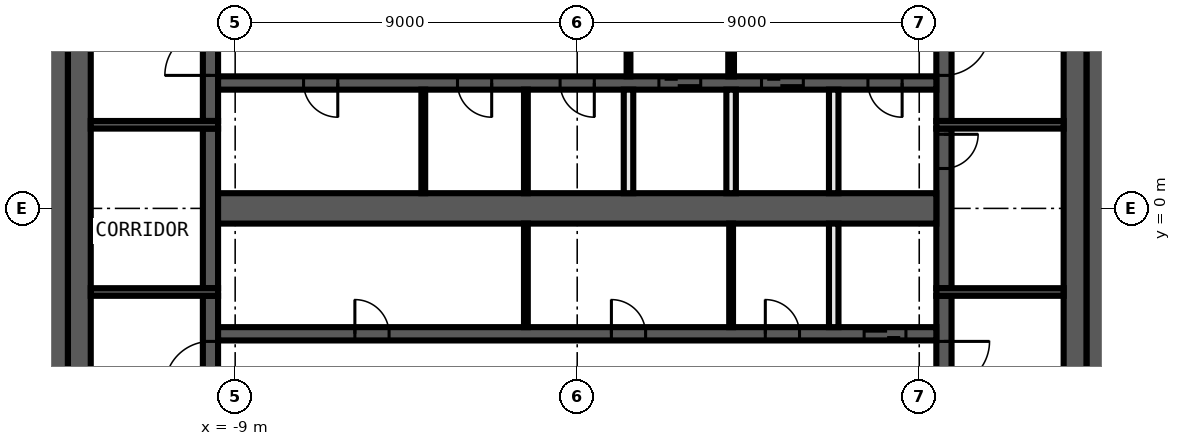
"""IFC4 building model, lengths in metres.
Left out: names, types, materials, properties, quantities, classifications, styles, units other than length and angle.
Written with IfcOpenShell. Run it as: python <this file> out.ifc"""

import sys

from ifc_helpers import new_model, si_unit, direction, frame, frame_2d, origin, place, context, subcontext, project, spatial, rectangle, extrude, element, fill, save


model = new_model("IFC4")
c1 = context("Model", 3, precision=1e-05, world=origin(), true_north=direction((0.0, 1.0)))
c2 = subcontext(c1, "Body", "Model", "MODEL_VIEW")
j1 = project(units=[si_unit("LENGTHUNIT", "METRE"), si_unit("PLANEANGLEUNIT", "RADIAN")], contexts=[c1])
p1 = place(None, origin())
s1 = spatial("IfcSite", under=j1, at=p1, CompositionType="ELEMENT")
p2 = place(p1, origin())
s2 = spatial("IfcBuilding", under=s1, at=p2, CompositionType="ELEMENT")
p3 = place(p2, frame((0.0, 0.0, 311.0)))
s3 = spatial("IfcBuildingStorey", under=s2, at=p3, CompositionType="ELEMENT", Elevation=311.0)
for number, where, z_axis, x_axis in (
    (1, (13.7, 10.4, 0.0), (0.0, 0.0, 1.0), (0.0, -1.0, 0.0)),
    (2, (-13.7, -10.4, 0.0), (0.0, 0.0, 1.0), (0.0, 1.0, 0.0)),
):
    element("IfcWall", number, at=place(p3, frame(where, z_axis=z_axis, x_axis=x_axis)), inside=s3, PredefinedType="SHEAR", context=c2, shape_type="SweptSolid", body=[
        extrude(rectangle(XDim=20.8, YDim=0.6, at=frame_2d((10.4, 0.0))), origin(), (0.0, 0.0, 1.0), 3.82),
    ])
for number, where, z_axis, x_axis in (
    (3, (13.1, 9.8, 0.0), (0.0, 0.0, 1.0), (0.0, -1.0, 0.0)),
    (4, (-13.1, -9.8, 0.0), (0.0, 0.0, 1.0), (0.0, 1.0, 0.0)),
):
    element("IfcWall", number, at=place(p3, frame(where, z_axis=z_axis, x_axis=x_axis)), inside=s3, PredefinedType="SHEAR", context=c2, shape_type="SweptSolid", body=[
        extrude(rectangle(XDim=19.6, YDim=0.6, at=frame_2d((9.8, 0.0))), origin(), (0.0, 0.0, 1.0), 3.82),
    ])
p4 = place(p3, frame((9.65, -2.3, 0.0), z_axis=(0.0, 0.0, 1.0), x_axis=(0.0, -1.0, 0.0)))
e5 = element("IfcWall", 5, at=p4, inside=s3, PredefinedType="SHEAR", context=c2, shape_type="SweptSolid", body=[
    extrude(rectangle(XDim=7.5, YDim=0.4, at=frame_2d((3.75, 0.0))), origin(), (0.0, 0.0, 1.0), 3.82),
])
p5 = place(p4, frame((1.2, 0.0, 0.0)))
e6 = element("IfcOpeningElement", 6, at=p5, cuts=e5, PredefinedType="OPENING", context=c2, shape_type="SweptSolid", body=[
    extrude(rectangle(XDim=1.2, YDim=2.1, at=frame_2d((0.6, 1.05))), frame((0.0, 0.21, 0.0), z_axis=(0.0, -1.0, 0.0), x_axis=(1.0, 0.0, 0.0)), (0.0, 0.0, 1.0), 0.42),
])
p6 = place(p3, frame((9.65, 2.1, 0.0), z_axis=(0.0, 0.0, 1.0), x_axis=(0.0, -1.0, 0.0)))
e7 = element("IfcWall", 7, at=p6, inside=s3, PredefinedType="SHEAR", context=c2, shape_type="SweptSolid", body=[
    extrude(rectangle(XDim=4.2, YDim=0.4, at=frame_2d((2.1, 0.0))), origin(), (0.0, 0.0, 1.0), 3.82),
])
p7 = place(p6, frame((0.15, 0.0, 0.0)))
e8 = element("IfcOpeningElement", 8, at=p7, cuts=e7, PredefinedType="OPENING", context=c2, shape_type="SweptSolid", body=[
    extrude(rectangle(XDim=0.9, YDim=2.1, at=frame_2d((0.45, 1.05))), frame((0.0, 0.21, 0.0), z_axis=(0.0, -1.0, 0.0), x_axis=(1.0, 0.0, 0.0)), (0.0, 0.0, 1.0), 0.42),
])
p8 = place(p3, frame((9.65, 9.8, 0.0), z_axis=(0.0, 0.0, 1.0), x_axis=(0.0, -1.0, 0.0)))
e9 = element("IfcWall", 9, at=p8, inside=s3, PredefinedType="SHEAR", context=c2, shape_type="SweptSolid", body=[
    extrude(rectangle(XDim=7.5, YDim=0.4, at=frame_2d((3.75, 0.0))), origin(), (0.0, 0.0, 1.0), 3.82),
])
p9 = place(p8, frame((5.1, 0.0, 0.0)))
e10 = element("IfcOpeningElement", 10, at=p9, cuts=e9, PredefinedType="OPENING", context=c2, shape_type="SweptSolid", body=[
    extrude(rectangle(XDim=1.2, YDim=2.1, at=frame_2d((0.6, 1.05))), frame((0.0, 0.21, 0.0), z_axis=(0.0, -1.0, 0.0), x_axis=(1.0, 0.0, 0.0)), (0.0, 0.0, 1.0), 0.42),
])
p10 = place(p3, frame((-9.65, -9.8, 0.0), z_axis=(0.0, 0.0, 1.0), x_axis=(0.0, 1.0, 0.0)))
e11 = element("IfcWall", 11, at=p10, inside=s3, PredefinedType="SHEAR", context=c2, shape_type="SweptSolid", body=[
    extrude(rectangle(XDim=7.5, YDim=0.4, at=frame_2d((3.75, 0.0))), origin(), (0.0, 0.0, 1.0), 3.82),
])
p11 = place(p10, frame((5.1, 0.0, 0.0)))
e12 = element("IfcOpeningElement", 12, at=p11, cuts=e11, PredefinedType="OPENING", context=c2, shape_type="SweptSolid", body=[
    extrude(rectangle(XDim=1.2, YDim=2.1, at=frame_2d((0.6, 1.05))), frame((0.0, 0.21, 0.0), z_axis=(0.0, -1.0, 0.0), x_axis=(1.0, 0.0, 0.0)), (0.0, 0.0, 1.0), 0.42),
])
p12 = place(p3, frame((-9.65, -2.1, 0.0), z_axis=(0.0, 0.0, 1.0), x_axis=(0.0, 1.0, 0.0)))
e13 = element("IfcWall", 13, at=p12, inside=s3, PredefinedType="SHEAR", context=c2, shape_type="SweptSolid", body=[
    extrude(rectangle(XDim=4.2, YDim=0.4, at=frame_2d((2.1, 0.0))), origin(), (0.0, 0.0, 1.0), 3.82),
])
p13 = place(p3, frame((-9.65, 2.3, 0.0), z_axis=(0.0, 0.0, 1.0), x_axis=(0.0, 1.0, 0.0)))
e14 = element("IfcWall", 14, at=p13, inside=s3, PredefinedType="SHEAR", context=c2, shape_type="SweptSolid", body=[
    extrude(rectangle(XDim=7.5, YDim=0.4, at=frame_2d((3.75, 0.0))), origin(), (0.0, 0.0, 1.0), 3.82),
])
p14 = place(p13, frame((1.2, 0.0, 0.0)))
e15 = element("IfcOpeningElement", 15, at=p14, cuts=e14, PredefinedType="OPENING", context=c2, shape_type="SweptSolid", body=[
    extrude(rectangle(XDim=1.2, YDim=2.1, at=frame_2d((0.6, 1.05))), frame((0.0, 0.21, 0.0), z_axis=(0.0, -1.0, 0.0), x_axis=(1.0, 0.0, 0.0)), (0.0, 0.0, 1.0), 0.42),
])
for number, where, z_axis, x_axis in (
    (16, (9.45, 2.2, 0.0), (0.0, 0.0, 1.0), (1.0, 0.0, 0.0)),
    (17, (-9.45, 2.2, 0.0), (0.0, 0.0, 1.0), (-1.0, 0.0, 0.0)),
    (18, (9.45, -2.2, 0.0), (0.0, 0.0, 1.0), (1.0, 0.0, 0.0)),
    (19, (-9.45, -2.2, 0.0), (0.0, 0.0, 1.0), (-1.0, 0.0, 0.0)),
):
    element("IfcWall", number, at=place(p3, frame(where, z_axis=z_axis, x_axis=x_axis)), inside=s3, PredefinedType="SHEAR", context=c2, shape_type="SweptSolid", body=[
        extrude(rectangle(XDim=3.35, YDim=0.2, at=frame_2d((1.675, 0.0))), origin(), (0.0, 0.0, 1.0), 3.82),
    ])
p15 = place(p3, frame((9.45, 3.3, 0.0), z_axis=(0.0, 0.0, 1.0), x_axis=(-1.0, 0.0, 0.0)))
e20 = element("IfcWall", 20, at=p15, inside=s3, PredefinedType="SHEAR", context=c2, shape_type="SweptSolid", body=[
    extrude(rectangle(XDim=18.9, YDim=0.35, at=frame_2d((9.45, 0.0))), origin(), (0.0, 0.0, 1.0), 3.82),
])
p16 = place(p15, frame((6.2, 0.0, 0.0)))
e21 = element("IfcOpeningElement", 21, at=p16, cuts=e20, PredefinedType="OPENING", context=c2, shape_type="SweptSolid", body=[
    extrude(rectangle(XDim=1.1, YDim=2.1, at=frame_2d((0.55, 1.05))), frame((0.0, 0.185, 0.0), z_axis=(0.0, -1.0, 0.0), x_axis=(1.0, 0.0, 0.0)), (0.0, 0.0, 1.0), 0.37),
])
p17 = place(p15, frame((3.5, 0.0, 0.0)))
e22 = element("IfcOpeningElement", 22, at=p17, cuts=e20, PredefinedType="OPENING", context=c2, shape_type="SweptSolid", body=[
    extrude(rectangle(XDim=1.1, YDim=2.1, at=frame_2d((0.55, 1.05))), frame((0.0, 0.185, 0.0), z_axis=(0.0, -1.0, 0.0), x_axis=(1.0, 0.0, 0.0)), (0.0, 0.0, 1.0), 0.37),
])
p18 = place(p15, frame((0.9, 0.0, 0.0)))
e23 = element("IfcOpeningElement", 23, at=p18, cuts=e20, PredefinedType="OPENING", context=c2, shape_type="SweptSolid", body=[
    extrude(rectangle(XDim=0.9, YDim=2.1, at=frame_2d((0.45, 1.05))), frame((0.0, 0.185, 0.0), z_axis=(0.0, -1.0, 0.0), x_axis=(1.0, 0.0, 0.0)), (0.0, 0.0, 1.0), 0.37),
])
p19 = place(p15, frame((15.75, 0.0, 0.0)))
e24 = element("IfcOpeningElement", 24, at=p19, cuts=e20, PredefinedType="OPENING", context=c2, shape_type="SweptSolid", body=[
    extrude(rectangle(XDim=0.9, YDim=2.1, at=frame_2d((0.45, 1.05))), frame((0.0, 0.185, 0.0), z_axis=(0.0, -1.0, 0.0), x_axis=(1.0, 0.0, 0.0)), (0.0, 0.0, 1.0), 0.37),
])
p20 = place(p15, frame((11.7, 0.0, 0.0)))
e25 = element("IfcOpeningElement", 25, at=p20, cuts=e20, PredefinedType="OPENING", context=c2, shape_type="SweptSolid", body=[
    extrude(rectangle(XDim=0.9, YDim=2.1, at=frame_2d((0.45, 1.05))), frame((0.0, 0.185, 0.0), z_axis=(0.0, -1.0, 0.0), x_axis=(1.0, 0.0, 0.0)), (0.0, 0.0, 1.0), 0.37),
])
p21 = place(p15, frame((9.0, 0.0, 0.0)))
e26 = element("IfcOpeningElement", 26, at=p21, cuts=e20, PredefinedType="OPENING", context=c2, shape_type="SweptSolid", body=[
    extrude(rectangle(XDim=0.9, YDim=2.1, at=frame_2d((0.45, 1.05))), frame((0.0, 0.185, 0.0), z_axis=(0.0, -1.0, 0.0), x_axis=(1.0, 0.0, 0.0)), (0.0, 0.0, 1.0), 0.37),
])
p22 = place(p3, frame((-9.45, -3.3, 0.0), z_axis=(0.0, 0.0, 1.0), x_axis=(1.0, 0.0, 0.0)))
e27 = element("IfcWall", 27, at=p22, inside=s3, PredefinedType="SHEAR", context=c2, shape_type="SweptSolid", body=[
    extrude(rectangle(XDim=18.9, YDim=0.35, at=frame_2d((9.45, 0.0))), origin(), (0.0, 0.0, 1.0), 3.82),
])
p23 = place(p22, frame((17.0, 0.0, 0.0)))
e28 = element("IfcOpeningElement", 28, at=p23, cuts=e27, PredefinedType="OPENING", context=c2, shape_type="SweptSolid", body=[
    extrude(rectangle(XDim=1.1, YDim=2.1, at=frame_2d((0.55, 1.05))), frame((0.0, 0.185, 0.0), z_axis=(0.0, -1.0, 0.0), x_axis=(1.0, 0.0, 0.0)), (0.0, 0.0, 1.0), 0.37),
])
p24 = place(p22, frame((3.6, 0.0, 0.0)))
e29 = element("IfcOpeningElement", 29, at=p24, cuts=e27, PredefinedType="OPENING", context=c2, shape_type="SweptSolid", body=[
    extrude(rectangle(XDim=0.9, YDim=2.1, at=frame_2d((0.45, 1.05))), frame((0.0, 0.185, 0.0), z_axis=(0.0, -1.0, 0.0), x_axis=(1.0, 0.0, 0.0)), (0.0, 0.0, 1.0), 0.37),
])
p25 = place(p22, frame((10.35, 0.0, 0.0)))
e30 = element("IfcOpeningElement", 30, at=p25, cuts=e27, PredefinedType="OPENING", context=c2, shape_type="SweptSolid", body=[
    extrude(rectangle(XDim=0.9, YDim=2.1, at=frame_2d((0.45, 1.05))), frame((0.0, 0.185, 0.0), z_axis=(0.0, -1.0, 0.0), x_axis=(1.0, 0.0, 0.0)), (0.0, 0.0, 1.0), 0.37),
])
p26 = place(p22, frame((14.4, 0.0, 0.0)))
e31 = element("IfcOpeningElement", 31, at=p26, cuts=e27, PredefinedType="OPENING", context=c2, shape_type="SweptSolid", body=[
    extrude(rectangle(XDim=0.9, YDim=2.1, at=frame_2d((0.45, 1.05))), frame((0.0, 0.185, 0.0), z_axis=(0.0, -1.0, 0.0), x_axis=(1.0, 0.0, 0.0)), (0.0, 0.0, 1.0), 0.37),
])
p27 = place(p3, frame((-9.45, 0.0, 0.0), z_axis=(0.0, 0.0, 1.0), x_axis=(1.0, 0.0, 0.0)))
e32 = element("IfcWall", 32, at=p27, inside=s3, PredefinedType="SHEAR", context=c2, shape_type="SweptSolid", body=[
    extrude(rectangle(XDim=18.9, YDim=0.8, at=frame_2d((9.45, 0.0))), origin(), (0.0, 0.0, 1.0), 3.82),
])
for number, where, z_axis, x_axis in (
    (33, (6.75, -3.125, 0.0), (0.0, 0.0, 1.0), (0.0, 1.0, 0.0)),
    (34, (6.75, 0.4, 0.0), (0.0, 0.0, 1.0), (0.0, 1.0, 0.0)),
):
    element("IfcWall", number, at=place(p3, frame(where, z_axis=z_axis, x_axis=x_axis)), inside=s3, PredefinedType="SOLIDWALL", context=c2, shape_type="SweptSolid", body=[
        extrude(rectangle(XDim=2.725, YDim=0.25, at=frame_2d((1.363, 0.0))), origin(), (0.0, 0.0, 1.0), 3.82),
    ])
p28 = place(p3, frame((4.05, 6.725, 0.0), z_axis=(0.0, 0.0, 1.0), x_axis=(0.0, -1.0, 0.0)))
e35 = element("IfcWall", 35, at=p28, inside=s3, PredefinedType="PARTITIONING", context=c2, shape_type="SweptSolid", body=[
    extrude(rectangle(XDim=3.25, YDim=0.15, at=frame_2d((1.625, 0.0))), origin(), (0.0, 0.0, 1.0), 3.82),
])
p29 = place(p28, frame((1.025, 0.0, 0.0)))
e36 = element("IfcOpeningElement", 36, at=p29, cuts=e35, PredefinedType="OPENING", context=c2, shape_type="SweptSolid", body=[
    extrude(rectangle(XDim=1.2, YDim=2.1, at=frame_2d((0.6, 1.05))), frame((0.0, 0.085, 0.0), z_axis=(0.0, -1.0, 0.0), x_axis=(1.0, 0.0, 0.0)), (0.0, 0.0, 1.0), 0.17),
])
p30 = place(p3, frame((4.05, -3.125, 0.0), z_axis=(0.0, 0.0, 1.0), x_axis=(0.0, 1.0, 0.0)))
e37 = element("IfcWall", 37, at=p30, inside=s3, PredefinedType="PARTITIONING", context=c2, shape_type="SweptSolid", body=[
    extrude(rectangle(XDim=2.725, YDim=0.1, at=frame_2d((1.363, 0.0))), origin(), (0.0, 0.0, 1.0), 3.82),
])
p31 = place(p3, frame((4.05, 0.4, 0.0), z_axis=(0.0, 0.0, 1.0), x_axis=(0.0, 1.0, 0.0)))
e38 = element("IfcWall", 38, at=p31, inside=s3, PredefinedType="SOLIDWALL", context=c2, shape_type="SweptSolid", body=[
    extrude(rectangle(XDim=2.725, YDim=0.25, at=frame_2d((1.363, 0.0))), origin(), (0.0, 0.0, 1.0), 3.82),
])
p32 = place(p3, frame((1.35, 6.725, 0.0), z_axis=(0.0, 0.0, 1.0), x_axis=(0.0, -1.0, 0.0)))
e39 = element("IfcWall", 39, at=p32, inside=s3, PredefinedType="PARTITIONING", context=c2, shape_type="SweptSolid", body=[
    extrude(rectangle(XDim=3.25, YDim=0.1, at=frame_2d((1.625, 0.0))), origin(), (0.0, 0.0, 1.0), 3.82),
])
p33 = place(p32, frame((1.025, 0.0, 0.0)))
e40 = element("IfcOpeningElement", 40, at=p33, cuts=e39, PredefinedType="OPENING", context=c2, shape_type="SweptSolid", body=[
    extrude(rectangle(XDim=1.2, YDim=2.1, at=frame_2d((0.6, 1.05))), frame((0.0, 0.06, 0.0), z_axis=(0.0, -1.0, 0.0), x_axis=(1.0, 0.0, 0.0)), (0.0, 0.0, 1.0), 0.12),
])
p34 = place(p3, frame((1.35, 0.4, 0.0), z_axis=(0.0, 0.0, 1.0), x_axis=(0.0, 1.0, 0.0)))
e41 = element("IfcWall", 41, at=p34, inside=s3, PredefinedType="SOLIDWALL", context=c2, shape_type="SweptSolid", body=[
    extrude(rectangle(XDim=2.725, YDim=0.25, at=frame_2d((1.363, 0.0))), origin(), (0.0, 0.0, 1.0), 3.82),
])
for number, where, z_axis, x_axis in (
    (42, (-1.35, -3.125, 0.0), (0.0, 0.0, 1.0), (0.0, 1.0, 0.0)),
    (43, (-1.35, 0.4, 0.0), (0.0, 0.0, 1.0), (0.0, 1.0, 0.0)),
    (44, (-4.05, 0.4, 0.0), (0.0, 0.0, 1.0), (0.0, 1.0, 0.0)),
):
    element("IfcWall", number, at=place(p3, frame(where, z_axis=z_axis, x_axis=x_axis)), inside=s3, PredefinedType="PARTITIONING", context=c2, shape_type="SweptSolid", body=[
        extrude(rectangle(XDim=2.725, YDim=0.1, at=frame_2d((1.363, 0.0))), origin(), (0.0, 0.0, 1.0), 3.82),
    ])
p35 = place(p7, origin())
e45 = element("IfcDoor", 45, at=p35, inside=s3, OperationType="SINGLE_SWING_RIGHT", PredefinedType="DOOR", context=c2, shape_type="SweptSolid", body=[
    extrude(rectangle(XDim=0.9, YDim=2.1, at=frame_2d((0.45, 1.05))), frame((0.0, 0.025, 0.0), z_axis=(0.0, -1.0, 0.0), x_axis=(1.0, 0.0, 0.0)), (0.0, 0.0, 1.0), 0.05),
])
fill(e8, e45)
p36 = place(p16, origin())
e46 = element("IfcDoor", 46, at=p36, inside=s3, OperationType="DOUBLE_DOOR_SLIDING", PredefinedType="DOOR", context=c2, shape_type="SweptSolid", body=[
    extrude(rectangle(XDim=1.1, YDim=2.1, at=frame_2d((0.55, 1.05))), frame((0.0, 0.025, 0.0), z_axis=(0.0, -1.0, 0.0), x_axis=(1.0, 0.0, 0.0)), (0.0, 0.0, 1.0), 0.05),
])
fill(e21, e46)
p37 = place(p17, origin())
e47 = element("IfcDoor", 47, at=p37, inside=s3, OperationType="DOUBLE_DOOR_SLIDING", PredefinedType="DOOR", context=c2, shape_type="SweptSolid", body=[
    extrude(rectangle(XDim=1.1, YDim=2.1, at=frame_2d((0.55, 1.05))), frame((0.0, 0.025, 0.0), z_axis=(0.0, -1.0, 0.0), x_axis=(1.0, 0.0, 0.0)), (0.0, 0.0, 1.0), 0.05),
])
fill(e22, e47)
p38 = place(p18, origin())
e48 = element("IfcDoor", 48, at=p38, inside=s3, OperationType="SINGLE_SWING_LEFT", PredefinedType="DOOR", context=c2, shape_type="SweptSolid", body=[
    extrude(rectangle(XDim=0.9, YDim=2.1, at=frame_2d((0.45, 1.05))), frame((0.0, 0.025, 0.0), z_axis=(0.0, -1.0, 0.0), x_axis=(1.0, 0.0, 0.0)), (0.0, 0.0, 1.0), 0.05),
])
fill(e23, e48)
p39 = place(p23, origin())
e49 = element("IfcDoor", 49, at=p39, inside=s3, OperationType="DOUBLE_DOOR_SLIDING", PredefinedType="DOOR", context=c2, shape_type="SweptSolid", body=[
    extrude(rectangle(XDim=1.1, YDim=2.1, at=frame_2d((0.55, 1.05))), frame((0.0, 0.025, 0.0), z_axis=(0.0, -1.0, 0.0), x_axis=(1.0, 0.0, 0.0)), (0.0, 0.0, 1.0), 0.05),
])
fill(e28, e49)
p40 = place(p19, origin())
e50 = element("IfcDoor", 50, at=p40, inside=s3, OperationType="SINGLE_SWING_LEFT", PredefinedType="DOOR", context=c2, shape_type="SweptSolid", body=[
    extrude(rectangle(XDim=0.9, YDim=2.1, at=frame_2d((0.45, 1.05))), frame((0.0, 0.025, 0.0), z_axis=(0.0, -1.0, 0.0), x_axis=(1.0, 0.0, 0.0)), (0.0, 0.0, 1.0), 0.05),
])
fill(e24, e50)
p41 = place(p20, origin())
e51 = element("IfcDoor", 51, at=p41, inside=s3, OperationType="SINGLE_SWING_RIGHT", PredefinedType="DOOR", context=c2, shape_type="SweptSolid", body=[
    extrude(rectangle(XDim=0.9, YDim=2.1, at=frame_2d((0.45, 1.05))), frame((0.0, 0.025, 0.0), z_axis=(0.0, -1.0, 0.0), x_axis=(1.0, 0.0, 0.0)), (0.0, 0.0, 1.0), 0.05),
])
fill(e25, e51)
p42 = place(p21, origin())
e52 = element("IfcDoor", 52, at=p42, inside=s3, OperationType="SINGLE_SWING_LEFT", PredefinedType="DOOR", context=c2, shape_type="SweptSolid", body=[
    extrude(rectangle(XDim=0.9, YDim=2.1, at=frame_2d((0.45, 1.05))), frame((0.0, 0.025, 0.0), z_axis=(0.0, -1.0, 0.0), x_axis=(1.0, 0.0, 0.0)), (0.0, 0.0, 1.0), 0.05),
])
fill(e26, e52)
p43 = place(p24, origin())
e53 = element("IfcDoor", 53, at=p43, inside=s3, OperationType="SINGLE_SWING_RIGHT", PredefinedType="DOOR", context=c2, shape_type="SweptSolid", body=[
    extrude(rectangle(XDim=0.9, YDim=2.1, at=frame_2d((0.45, 1.05))), frame((0.0, 0.025, 0.0), z_axis=(0.0, -1.0, 0.0), x_axis=(1.0, 0.0, 0.0)), (0.0, 0.0, 1.0), 0.05),
])
fill(e29, e53)
p44 = place(p25, origin())
e54 = element("IfcDoor", 54, at=p44, inside=s3, OperationType="SINGLE_SWING_LEFT", PredefinedType="DOOR", context=c2, shape_type="SweptSolid", body=[
    extrude(rectangle(XDim=0.9, YDim=2.1, at=frame_2d((0.45, 1.05))), frame((0.0, 0.025, 0.0), z_axis=(0.0, -1.0, 0.0), x_axis=(1.0, 0.0, 0.0)), (0.0, 0.0, 1.0), 0.05),
])
fill(e30, e54)
p45 = place(p26, origin())
e55 = element("IfcDoor", 55, at=p45, inside=s3, OperationType="SINGLE_SWING_RIGHT", PredefinedType="DOOR", context=c2, shape_type="SweptSolid", body=[
    extrude(rectangle(XDim=0.9, YDim=2.1, at=frame_2d((0.45, 1.05))), frame((0.0, 0.025, 0.0), z_axis=(0.0, -1.0, 0.0), x_axis=(1.0, 0.0, 0.0)), (0.0, 0.0, 1.0), 0.05),
])
fill(e31, e55)
p46 = place(p9, origin())
e56 = element("IfcDoor", 56, at=p46, inside=s3, OperationType="SINGLE_SWING_LEFT", PredefinedType="DOOR", context=c2, shape_type="SweptSolid", body=[
    extrude(rectangle(XDim=1.2, YDim=2.1, at=frame_2d((0.6, 1.05))), frame((0.0, 0.025, 0.0), z_axis=(0.0, -1.0, 0.0), x_axis=(1.0, 0.0, 0.0)), (0.0, 0.0, 1.0), 0.05),
])
fill(e10, e56)
p47 = place(p14, origin())
e57 = element("IfcDoor", 57, at=p47, inside=s3, OperationType="SINGLE_SWING_RIGHT", PredefinedType="DOOR", context=c2, shape_type="SweptSolid", body=[
    extrude(rectangle(XDim=1.2, YDim=2.1, at=frame_2d((0.6, 1.05))), frame((0.0, 0.025, 0.0), z_axis=(0.0, -1.0, 0.0), x_axis=(1.0, 0.0, 0.0)), (0.0, 0.0, 1.0), 0.05),
])
fill(e15, e57)
p48 = place(p5, origin())
e58 = element("IfcDoor", 58, at=p48, inside=s3, OperationType="SINGLE_SWING_RIGHT", PredefinedType="DOOR", context=c2, shape_type="SweptSolid", body=[
    extrude(rectangle(XDim=1.2, YDim=2.1, at=frame_2d((0.6, 1.05))), frame((0.0, 0.025, 0.0), z_axis=(0.0, -1.0, 0.0), x_axis=(1.0, 0.0, 0.0)), (0.0, 0.0, 1.0), 0.05),
])
fill(e6, e58)
p49 = place(p11, origin())
e59 = element("IfcDoor", 59, at=p49, inside=s3, OperationType="SINGLE_SWING_LEFT", PredefinedType="DOOR", context=c2, shape_type="SweptSolid", body=[
    extrude(rectangle(XDim=1.2, YDim=2.1, at=frame_2d((0.6, 1.05))), frame((0.0, 0.025, 0.0), z_axis=(0.0, -1.0, 0.0), x_axis=(1.0, 0.0, 0.0)), (0.0, 0.0, 1.0), 0.05),
])
fill(e12, e59)
save(model, sys.argv[1])
